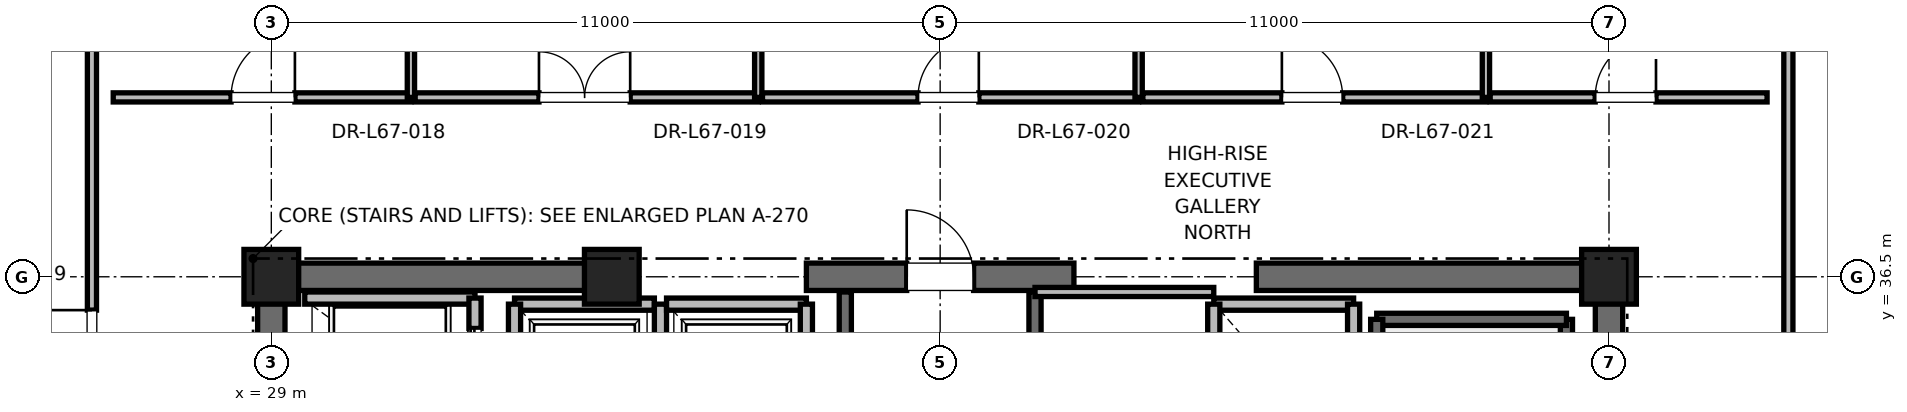
"""IFC4 building model, lengths in metres.
Left out: names, types, materials, properties, quantities, classifications, styles, units other than length and angle.
Written with IfcOpenShell. Run it as: python <this file> out.ifc"""

import sys

from ifc_helpers import new_model, si_unit, direction, frame, frame_2d, origin, origin_2d, place, context, subcontext, project, spatial, rectangle, extrude, element, fill, save


model = new_model("IFC4")
c1 = context("Model", 3, precision=1e-05, world=origin(), true_north=direction((0.0, 1.0)))
c2 = subcontext(c1, "Body", "Model", "MODEL_VIEW")
j1 = project(units=[si_unit("LENGTHUNIT", "METRE"), si_unit("PLANEANGLEUNIT", "RADIAN")], contexts=[c1])
p1 = place(None, origin())
s1 = spatial("IfcSite", under=j1, at=p1, CompositionType="ELEMENT")
p2 = place(p1, origin())
s2 = spatial("IfcBuilding", under=s1, at=p2, CompositionType="ELEMENT")
p3 = place(p2, frame((0.0, 0.0, 287.2)))
s3 = spatial("IfcBuildingStorey", under=s2, at=p3, CompositionType="ELEMENT", Elevation=287.2)
for number, where, z_axis, x_axis in (
    (1, (29.0, 36.5, 0.0), (0.0, 0.0, 1.0), (1.0, 0.0, 0.0)),
    (2, (51.0, 36.5, 0.0), (0.0, 0.0, 1.0), (1.0, 0.0, 0.0)),
    (3, (34.6, 36.5, 0.0), (0.0, 0.0, 1.0), (1.0, 0.0, 0.0)),
):
    element("IfcColumn", number, at=place(p3, frame(where, z_axis=z_axis, x_axis=x_axis)), inside=s3, PredefinedType="PILASTER", context=c2, shape_type="SweptSolid", body=[
        extrude(rectangle(XDim=0.9, YDim=0.9, at=origin_2d()), origin(), (0.0, 0.0, 1.0), 4.0),
    ])
p4 = place(p3, frame((29.0, 36.5, 0.0), z_axis=(0.0, 0.0, 1.0), x_axis=(1.0, 0.0, 0.0)))
e4 = element("IfcWall", 4, at=p4, inside=s3, PredefinedType="SHEAR", context=c2, shape_type="SweptSolid", body=[
    extrude(rectangle(XDim=5.8, YDim=0.45, at=frame_2d((2.9, 0.0))), origin(), (0.0, 0.0, 1.0), 3.785),
])
p5 = place(p3, frame((37.8, 36.5, 0.0), z_axis=(0.0, 0.0, 1.0), x_axis=(1.0, 0.0, 0.0)))
e5 = element("IfcWall", 5, at=p5, inside=s3, PredefinedType="SHEAR", context=c2, shape_type="SweptSolid", body=[
    extrude(rectangle(XDim=4.4, YDim=0.45, at=frame_2d((2.2, 0.0))), origin(), (0.0, 0.0, 1.0), 3.785),
])
p6 = place(p5, frame((1.65, 0.0, 0.0)))
e6 = element("IfcOpeningElement", 6, at=p6, cuts=e5, PredefinedType="OPENING", context=c2, shape_type="SweptSolid", body=[
    extrude(rectangle(XDim=1.1, YDim=2.15, at=frame_2d((0.55, 1.075))), frame((0.0, 0.225, 0.0), z_axis=(0.0, -1.0, 0.0), x_axis=(1.0, 0.0, 0.0)), (0.0, 0.0, 1.0), 0.45),
])
for number, where, z_axis, x_axis in (
    (7, (45.2, 36.5, 0.0), (0.0, 0.0, 1.0), (1.0, 0.0, 0.0)),
    (8, (29.0, 30.7, 0.0), (0.0, 0.0, 1.0), (0.0, 1.0, 0.0)),
):
    element("IfcWall", number, at=place(p3, frame(where, z_axis=z_axis, x_axis=x_axis)), inside=s3, PredefinedType="SHEAR", context=c2, shape_type="SweptSolid", body=[
        extrude(rectangle(XDim=5.8, YDim=0.45, at=frame_2d((2.9, 0.0))), origin(), (0.0, 0.0, 1.0), 3.785),
    ])
p7 = place(p3, frame((51.0, 27.7, 0.0), z_axis=(0.0, 0.0, 1.0), x_axis=(0.0, 1.0, 0.0)))
e9 = element("IfcWall", 9, at=p7, inside=s3, PredefinedType="SHEAR", context=c2, shape_type="SweptSolid", body=[
    extrude(rectangle(XDim=8.8, YDim=0.45, at=frame_2d((4.4, 0.0))), origin(), (0.0, 0.0, 1.0), 3.785),
])
p8 = place(p3, frame((50.3, 27.65, 0.0), z_axis=(0.0, 0.0, 1.0), x_axis=(0.0, 1.0, 0.0)))
e10 = element("IfcWall", 10, at=p8, inside=s3, PredefinedType="SOLIDWALL", context=c2, shape_type="SweptSolid", body=[
    extrude(rectangle(XDim=8.15, YDim=0.2, at=frame_2d((4.075, 0.0))), origin(), (0.0, 0.0, 1.0), 3.785),
])
p9 = place(p3, frame((47.18, 35.8, 0.0), z_axis=(0.0, 0.0, 1.0), x_axis=(1.0, 0.0, 0.0)))
e11 = element("IfcWall", 11, at=p9, inside=s3, PredefinedType="SOLIDWALL", context=c2, shape_type="SweptSolid", body=[
    extrude(rectangle(XDim=3.12, YDim=0.2, at=frame_2d((1.56, 0.0))), origin(), (0.0, 0.0, 1.0), 3.785),
])
p10 = place(p3, frame((47.18, 27.62, 0.0), z_axis=(0.0, 0.0, 1.0), x_axis=(0.0, 1.0, 0.0)))
e12 = element("IfcWall", 12, at=p10, inside=s3, PredefinedType="SOLIDWALL", context=c2, shape_type="SweptSolid", body=[
    extrude(rectangle(XDim=8.18, YDim=0.2, at=frame_2d((4.09, 0.0))), origin(), (0.0, 0.0, 1.0), 3.785),
])
p11 = place(p3, frame((38.44, 27.38, 0.0), z_axis=(0.0, 0.0, 1.0), x_axis=(0.0, 1.0, 0.0)))
e13 = element("IfcWall", 13, at=p11, inside=s3, PredefinedType="SOLIDWALL", context=c2, shape_type="SweptSolid", body=[
    extrude(rectangle(XDim=8.87, YDim=0.2, at=frame_2d((4.435, 0.0))), origin(), (0.0, 0.0, 1.0), 3.785),
])
p12 = place(p3, frame((41.56, 27.68, 0.0), z_axis=(0.0, 0.0, 1.0), x_axis=(0.0, 1.0, 0.0)))
e14 = element("IfcWall", 14, at=p12, inside=s3, PredefinedType="SOLIDWALL", context=c2, shape_type="SweptSolid", body=[
    extrude(rectangle(XDim=8.57, YDim=0.2, at=frame_2d((4.285, 0.0))), origin(), (0.0, 0.0, 1.0), 3.785),
])
p13 = place(p3, frame((32.35, 36.15, 0.0), z_axis=(0.0, 0.0, 1.0), x_axis=(-1.0, 0.0, 0.0)))
e15 = element("IfcWall", 15, at=p13, inside=s3, PredefinedType="SOLIDWALL", context=c2, shape_type="SweptSolid", body=[
    extrude(rectangle(XDim=2.8, YDim=0.2, at=frame_2d((1.4, 0.0))), origin(), (0.0, 0.0, 1.0), 3.148),
])
p14 = place(p3, frame((32.35, 34.05, 0.0), z_axis=(0.0, 0.0, 1.0), x_axis=(0.0, 1.0, 0.0)))
e16 = element("IfcWall", 16, at=p14, inside=s3, PredefinedType="SOLIDWALL", context=c2, shape_type="SweptSolid", body=[
    extrude(rectangle(XDim=2.1, YDim=0.2, at=frame_2d((1.05, 0.0))), origin(), (0.0, 0.0, 1.0), 3.785),
])
p15 = place(p14, frame((0.5, 0.0, 0.0)))
e17 = element("IfcOpeningElement", 17, at=p15, cuts=e16, PredefinedType="OPENING", context=c2, shape_type="SweptSolid", body=[
    extrude(rectangle(XDim=1.1, YDim=2.2, at=frame_2d((0.55, 1.1))), frame((0.0, 0.1, 0.0), z_axis=(0.0, -1.0, 0.0), x_axis=(1.0, 0.0, 0.0)), (0.0, 0.0, 1.0), 0.2),
])
p16 = place(p3, frame((35.3, 36.05, 0.0), z_axis=(0.0, 0.0, 1.0), x_axis=(-1.0, 0.0, 0.0)))
e18 = element("IfcWall", 18, at=p16, inside=s3, PredefinedType="SOLIDWALL", context=c2, shape_type="SweptSolid", body=[
    extrude(rectangle(XDim=2.3, YDim=0.2, at=frame_2d((1.15, 0.0))), origin(), (0.0, 0.0, 1.0), 2.865),
])
p17 = place(p3, frame((33.0, 36.05, 0.0), z_axis=(0.0, 0.0, 1.0), x_axis=(0.0, -1.0, 0.0)))
e19 = element("IfcWall", 19, at=p17, inside=s3, PredefinedType="SOLIDWALL", context=c2, shape_type="SweptSolid", body=[
    extrude(rectangle(XDim=2.6, YDim=0.2, at=frame_2d((1.3, 0.0))), origin(), (0.0, 0.0, 1.0), 3.785),
])
p18 = place(p3, frame((35.4, 33.45, 0.0), z_axis=(0.0, 0.0, 1.0), x_axis=(0.0, 1.0, 0.0)))
e20 = element("IfcWall", 20, at=p18, inside=s3, PredefinedType="SOLIDWALL", context=c2, shape_type="SweptSolid", body=[
    extrude(rectangle(XDim=2.6, YDim=0.2, at=frame_2d((1.3, 0.0))), origin(), (0.0, 0.0, 1.0), 2.865),
])
p19 = place(p3, frame((37.8, 36.05, 0.0), z_axis=(0.0, 0.0, 1.0), x_axis=(-1.0, 0.0, 0.0)))
e21 = element("IfcWall", 21, at=p19, inside=s3, PredefinedType="SOLIDWALL", context=c2, shape_type="SweptSolid", body=[
    extrude(rectangle(XDim=2.3, YDim=0.2, at=frame_2d((1.15, 0.0))), origin(), (0.0, 0.0, 1.0), 2.865),
])
p20 = place(p3, frame((37.8, 33.45, 0.0), z_axis=(0.0, 0.0, 1.0), x_axis=(0.0, 1.0, 0.0)))
e22 = element("IfcWall", 22, at=p20, inside=s3, PredefinedType="SOLIDWALL", context=c2, shape_type="SweptSolid", body=[
    extrude(rectangle(XDim=2.6, YDim=0.2, at=frame_2d((1.3, 0.0))), origin(), (0.0, 0.0, 1.0), 2.865),
])
p21 = place(p3, frame((46.8, 36.05, 0.0), z_axis=(0.0, 0.0, 1.0), x_axis=(-1.0, 0.0, 0.0)))
e23 = element("IfcWall", 23, at=p21, inside=s3, PredefinedType="SOLIDWALL", context=c2, shape_type="SweptSolid", body=[
    extrude(rectangle(XDim=2.3, YDim=0.2, at=frame_2d((1.15, 0.0))), origin(), (0.0, 0.0, 1.0), 2.865),
])
p22 = place(p3, frame((44.5, 36.05, 0.0), z_axis=(0.0, 0.0, 1.0), x_axis=(0.0, -1.0, 0.0)))
e24 = element("IfcWall", 24, at=p22, inside=s3, PredefinedType="SOLIDWALL", context=c2, shape_type="SweptSolid", body=[
    extrude(rectangle(XDim=2.6, YDim=0.2, at=frame_2d((1.3, 0.0))), origin(), (0.0, 0.0, 1.0), 2.865),
])
p23 = place(p3, frame((46.8, 33.45, 0.0), z_axis=(0.0, 0.0, 1.0), x_axis=(0.0, 1.0, 0.0)))
e25 = element("IfcWall", 25, at=p23, inside=s3, PredefinedType="SOLIDWALL", context=c2, shape_type="SweptSolid", body=[
    extrude(rectangle(XDim=2.6, YDim=0.2, at=frame_2d((1.3, 0.0))), origin(), (0.0, 0.0, 1.0), 3.785),
])
p24 = place(p3, frame((41.56, 36.25, 0.0), z_axis=(0.0, 0.0, 1.0), x_axis=(1.0, 0.0, 0.0)))
e26 = element("IfcWall", 26, at=p24, inside=s3, PredefinedType="PARTITIONING", context=c2, shape_type="SweptSolid", body=[
    extrude(rectangle(XDim=2.94, YDim=0.15, at=frame_2d((1.47, 0.0))), origin(), (0.0, 0.0, 1.0), 2.85),
])
p25 = place(p3, frame((26.4, 39.45, 0.0), z_axis=(0.0, 0.0, 1.0), x_axis=(1.0, 0.0, 0.0)))
e27 = element("IfcWall", 27, at=p25, inside=s3, PredefinedType="PARTITIONING", context=c2, shape_type="SweptSolid", body=[
    extrude(rectangle(XDim=4.896, YDim=0.15, at=frame_2d((2.448, 0.0))), origin(), (0.0, 0.0, 1.0), 2.85),
])
p26 = place(p25, frame((1.938, 0.0, 0.0)))
e28 = element("IfcOpeningElement", 28, at=p26, cuts=e27, PredefinedType="OPENING", context=c2, shape_type="SweptSolid", body=[
    extrude(rectangle(XDim=1.05, YDim=2.2, at=frame_2d((0.525, 1.1))), frame((0.0, 0.075, 0.0), z_axis=(0.0, -1.0, 0.0), x_axis=(1.0, 0.0, 0.0)), (0.0, 0.0, 1.0), 0.15),
])
p27 = place(p3, frame((31.296, 39.45, 0.0), z_axis=(0.0, 0.0, 1.0), x_axis=(0.0, 1.0, 0.0)))
e29 = element("IfcWall", 29, at=p27, inside=s3, PredefinedType="PARTITIONING", context=c2, shape_type="SweptSolid", body=[
    extrude(rectangle(XDim=9.964, YDim=0.12, at=frame_2d((4.982, 0.0))), origin(), (0.0, 0.0, 1.0), 2.415),
])
p28 = place(p3, frame((31.366, 39.45, 0.0), z_axis=(0.0, 0.0, 1.0), x_axis=(1.0, 0.0, 0.0)))
e30 = element("IfcWall", 30, at=p28, inside=s3, PredefinedType="PARTITIONING", context=c2, shape_type="SweptSolid", body=[
    extrude(rectangle(XDim=5.642, YDim=0.15, at=frame_2d((2.821, 0.0))), origin(), (0.0, 0.0, 1.0), 2.85),
])
p29 = place(p28, frame((2.036, 0.0, 0.0)))
e31 = element("IfcOpeningElement", 31, at=p29, cuts=e30, PredefinedType="OPENING", context=c2, shape_type="SweptSolid", body=[
    extrude(rectangle(XDim=1.5, YDim=2.25, at=frame_2d((0.75, 1.125))), frame((0.0, 0.075, 0.0), z_axis=(0.0, -1.0, 0.0), x_axis=(1.0, 0.0, 0.0)), (0.0, 0.0, 1.0), 0.15),
])
p30 = place(p3, frame((37.008, 39.45, 0.0), z_axis=(0.0, 0.0, 1.0), x_axis=(0.0, 1.0, 0.0)))
e32 = element("IfcWall", 32, at=p30, inside=s3, PredefinedType="PARTITIONING", context=c2, shape_type="SweptSolid", body=[
    extrude(rectangle(XDim=9.964, YDim=0.12, at=frame_2d((4.982, 0.0))), origin(), (0.0, 0.0, 1.0), 2.415),
])
p31 = place(p3, frame((37.078, 39.45, 0.0), z_axis=(0.0, 0.0, 1.0), x_axis=(1.0, 0.0, 0.0)))
e33 = element("IfcWall", 33, at=p31, inside=s3, PredefinedType="PARTITIONING", context=c2, shape_type="SweptSolid", body=[
    extrude(rectangle(XDim=6.186, YDim=0.15, at=frame_2d((3.093, 0.0))), origin(), (0.0, 0.0, 1.0), 2.85),
])
p32 = place(p31, frame((2.558, 0.0, 0.0)))
e34 = element("IfcOpeningElement", 34, at=p32, cuts=e33, PredefinedType="OPENING", context=c2, shape_type="SweptSolid", body=[
    extrude(rectangle(XDim=1.0, YDim=2.15, at=frame_2d((0.5, 1.075))), frame((0.0, 0.075, 0.0), z_axis=(0.0, -1.0, 0.0), x_axis=(1.0, 0.0, 0.0)), (0.0, 0.0, 1.0), 0.15),
])
p33 = place(p3, frame((43.264, 39.45, 0.0), z_axis=(0.0, 0.0, 1.0), x_axis=(0.0, 1.0, 0.0)))
e35 = element("IfcWall", 35, at=p33, inside=s3, PredefinedType="PARTITIONING", context=c2, shape_type="SweptSolid", body=[
    extrude(rectangle(XDim=9.964, YDim=0.12, at=frame_2d((4.982, 0.0))), origin(), (0.0, 0.0, 1.0), 2.415),
])
p34 = place(p3, frame((43.334, 39.45, 0.0), z_axis=(0.0, 0.0, 1.0), x_axis=(1.0, 0.0, 0.0)))
e36 = element("IfcWall", 36, at=p34, inside=s3, PredefinedType="PARTITIONING", context=c2, shape_type="SweptSolid", body=[
    extrude(rectangle(XDim=5.642, YDim=0.15, at=frame_2d((2.821, 0.0))), origin(), (0.0, 0.0, 1.0), 2.85),
])
p35 = place(p34, frame((2.286, 0.0, 0.0)))
e37 = element("IfcOpeningElement", 37, at=p35, cuts=e36, PredefinedType="OPENING", context=c2, shape_type="SweptSolid", body=[
    extrude(rectangle(XDim=1.0, YDim=2.15, at=frame_2d((0.5, 1.075))), frame((0.0, 0.075, 0.0), z_axis=(0.0, -1.0, 0.0), x_axis=(1.0, 0.0, 0.0)), (0.0, 0.0, 1.0), 0.15),
])
p36 = place(p3, frame((48.976, 39.45, 0.0), z_axis=(0.0, 0.0, 1.0), x_axis=(0.0, 1.0, 0.0)))
e38 = element("IfcWall", 38, at=p36, inside=s3, PredefinedType="PARTITIONING", context=c2, shape_type="SweptSolid", body=[
    extrude(rectangle(XDim=9.964, YDim=0.12, at=frame_2d((4.982, 0.0))), origin(), (0.0, 0.0, 1.0), 2.415),
])
p37 = place(p3, frame((49.046, 39.45, 0.0), z_axis=(0.0, 0.0, 1.0), x_axis=(1.0, 0.0, 0.0)))
e39 = element("IfcWall", 39, at=p37, inside=s3, PredefinedType="PARTITIONING", context=c2, shape_type="SweptSolid", body=[
    extrude(rectangle(XDim=4.554, YDim=0.15, at=frame_2d((2.277, 0.0))), origin(), (0.0, 0.0, 1.0), 2.85),
])
p38 = place(p37, frame((1.727, 0.0, 0.0)))
e40 = element("IfcOpeningElement", 40, at=p38, cuts=e39, PredefinedType="OPENING", context=c2, shape_type="SweptSolid", body=[
    extrude(rectangle(XDim=1.0, YDim=2.15, at=frame_2d((0.5, 1.075))), frame((0.0, 0.075, 0.0), z_axis=(0.0, -1.0, 0.0), x_axis=(1.0, 0.0, 0.0)), (0.0, 0.0, 1.0), 0.15),
])
p39 = place(p3, frame((26.05, 34.453, 0.0), z_axis=(0.0, 0.0, 1.0), x_axis=(0.0, 1.0, 0.0)))
e41 = element("IfcWall", 41, at=p39, inside=s3, PredefinedType="PARTITIONING", context=c2, shape_type="SweptSolid", body=[
    extrude(rectangle(XDim=11.161, YDim=0.15, at=frame_2d((5.581, 0.0))), origin(), (0.0, 0.0, 1.0), 2.85),
])
p40 = place(p39, frame((0.448, 0.0, 0.0)))
e42 = element("IfcOpeningElement", 42, at=p40, cuts=e41, PredefinedType="OPENING", context=c2, shape_type="SweptSolid", body=[
    extrude(rectangle(XDim=1.05, YDim=2.2, at=frame_2d((0.525, 1.1))), frame((0.0, 0.075, 0.0), z_axis=(0.0, -1.0, 0.0), x_axis=(1.0, 0.0, 0.0)), (0.0, 0.0, 1.0), 0.15),
])
p41 = place(p3, frame((53.95, 24.672, 0.0), z_axis=(0.0, 0.0, 1.0), x_axis=(0.0, 1.0, 0.0)))
e43 = element("IfcWall", 43, at=p41, inside=s3, PredefinedType="PARTITIONING", context=c2, shape_type="SweptSolid", body=[
    extrude(rectangle(XDim=20.943, YDim=0.15, at=frame_2d((10.471, 0.0))), origin(), (0.0, 0.0, 1.0), 2.85),
])
p42 = place(p41, frame((5.364, 0.0, 0.0)))
e44 = element("IfcOpeningElement", 44, at=p42, cuts=e43, PredefinedType="OPENING", context=c2, shape_type="SweptSolid", body=[
    extrude(rectangle(XDim=1.0, YDim=2.15, at=frame_2d((0.5, 1.075))), frame((0.0, 0.075, 0.0), z_axis=(0.0, -1.0, 0.0), x_axis=(1.0, 0.0, 0.0)), (0.0, 0.0, 1.0), 0.15),
])
p43 = place(p6, origin())
e45 = element("IfcDoor", 45, at=p43, inside=s3, OperationType="SINGLE_SWING_LEFT", PredefinedType="DOOR", context=c2, shape_type="SweptSolid", body=[
    extrude(rectangle(XDim=1.1, YDim=2.15, at=frame_2d((0.55, 1.075))), frame((0.0, 0.025, 0.0), z_axis=(0.0, -1.0, 0.0), x_axis=(1.0, 0.0, 0.0)), (0.0, 0.0, 1.0), 0.05),
])
fill(e6, e45)
p44 = place(p15, origin())
e46 = element("IfcDoor", 46, at=p44, inside=s3, OperationType="SLIDING_TO_RIGHT", PredefinedType="DOOR", context=c2, shape_type="SweptSolid", body=[
    extrude(rectangle(XDim=1.1, YDim=2.2, at=frame_2d((0.55, 1.1))), frame((0.0, 0.025, 0.0), z_axis=(0.0, -1.0, 0.0), x_axis=(1.0, 0.0, 0.0)), (0.0, 0.0, 1.0), 0.05),
])
fill(e17, e46)
p45 = place(p26, origin())
e47 = element("IfcDoor", 47, at=p45, inside=s3, OperationType="SINGLE_SWING_RIGHT", PredefinedType="DOOR", context=c2, shape_type="SweptSolid", body=[
    extrude(rectangle(XDim=1.05, YDim=2.2, at=frame_2d((0.525, 1.1))), frame((0.0, 0.025, 0.0), z_axis=(0.0, -1.0, 0.0), x_axis=(1.0, 0.0, 0.0)), (0.0, 0.0, 1.0), 0.05),
])
fill(e28, e47)
p46 = place(p29, origin())
e48 = element("IfcDoor", 48, at=p46, inside=s3, OperationType="DOUBLE_DOOR_SINGLE_SWING", PredefinedType="DOOR", context=c2, shape_type="SweptSolid", body=[
    extrude(rectangle(XDim=1.5, YDim=2.25, at=frame_2d((0.75, 1.125))), frame((0.0, 0.025, 0.0), z_axis=(0.0, -1.0, 0.0), x_axis=(1.0, 0.0, 0.0)), (0.0, 0.0, 1.0), 0.05),
])
fill(e31, e48)
p47 = place(p32, origin())
e49 = element("IfcDoor", 49, at=p47, inside=s3, OperationType="SINGLE_SWING_RIGHT", PredefinedType="DOOR", context=c2, shape_type="SweptSolid", body=[
    extrude(rectangle(XDim=1.0, YDim=2.15, at=frame_2d((0.5, 1.075))), frame((0.0, 0.025, 0.0), z_axis=(0.0, -1.0, 0.0), x_axis=(1.0, 0.0, 0.0)), (0.0, 0.0, 1.0), 0.05),
])
fill(e34, e49)
p48 = place(p35, origin())
e50 = element("IfcDoor", 50, at=p48, inside=s3, OperationType="SINGLE_SWING_LEFT", PredefinedType="DOOR", context=c2, shape_type="SweptSolid", body=[
    extrude(rectangle(XDim=1.0, YDim=2.15, at=frame_2d((0.5, 1.075))), frame((0.0, 0.025, 0.0), z_axis=(0.0, -1.0, 0.0), x_axis=(1.0, 0.0, 0.0)), (0.0, 0.0, 1.0), 0.05),
])
fill(e37, e50)
p49 = place(p38, origin())
e51 = element("IfcDoor", 51, at=p49, inside=s3, OperationType="SINGLE_SWING_RIGHT", PredefinedType="DOOR", context=c2, shape_type="SweptSolid", body=[
    extrude(rectangle(XDim=1.0, YDim=2.15, at=frame_2d((0.5, 1.075))), frame((0.0, 0.025, 0.0), z_axis=(0.0, -1.0, 0.0), x_axis=(1.0, 0.0, 0.0)), (0.0, 0.0, 1.0), 0.05),
])
fill(e40, e51)
p50 = place(p40, origin())
e52 = element("IfcDoor", 52, at=p50, inside=s3, OperationType="SINGLE_SWING_RIGHT", PredefinedType="DOOR", context=c2, shape_type="SweptSolid", body=[
    extrude(rectangle(XDim=1.05, YDim=2.2, at=frame_2d((0.525, 1.1))), frame((0.0, 0.025, 0.0), z_axis=(0.0, -1.0, 0.0), x_axis=(1.0, 0.0, 0.0)), (0.0, 0.0, 1.0), 0.05),
])
fill(e42, e52)
save(model, sys.argv[1])
